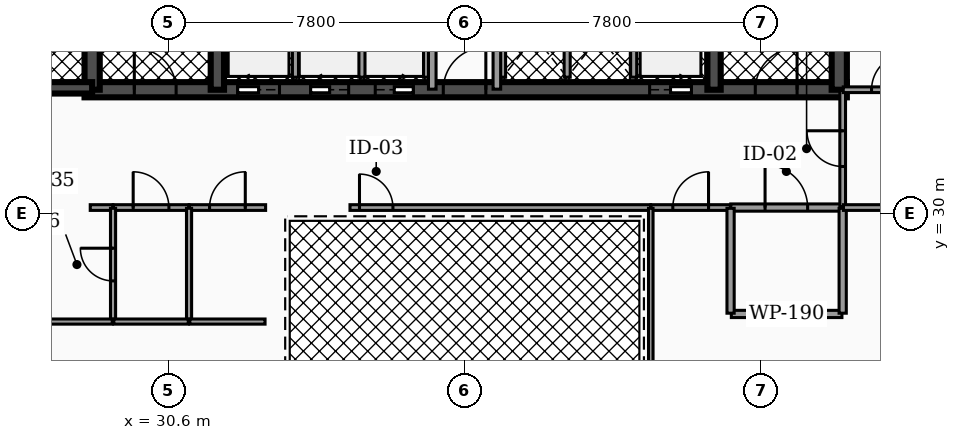
"""IFC4 building model, lengths in metres.
Left out: names, types, materials, properties, quantities, classifications, styles, units other than length and angle.
Written with IfcOpenShell. Run it as: python <this file> out.ifc"""

import sys

from ifc_helpers import new_model, si_unit, direction, frame, frame_2d, origin, place, context, subcontext, project, spatial, rectangle, extrude, element, fill, save


model = new_model("IFC4")
c1 = context("Model", 3, precision=1e-05, world=origin(), true_north=direction((0.0, 1.0)))
c2 = subcontext(c1, "Body", "Model", "MODEL_VIEW")
j1 = project(units=[si_unit("LENGTHUNIT", "METRE"), si_unit("PLANEANGLEUNIT", "RADIAN")], contexts=[c1])
p1 = place(None, origin())
s1 = spatial("IfcSite", under=j1, at=p1, CompositionType="ELEMENT")
p2 = place(p1, origin())
s2 = spatial("IfcBuilding", under=s1, at=p2, CompositionType="ELEMENT")
p3 = place(p2, frame((0.0, 0.0, 187.0)))
s3 = spatial("IfcBuildingStorey", under=s2, at=p3, CompositionType="ELEMENT", Elevation=187.0)
p4 = place(p3, frame((28.4, 33.25, 0.0), z_axis=(0.0, 0.0, 1.0), x_axis=(1.0, 0.0, 0.0)))
e1 = element("IfcWall", 1, at=p4, inside=s3, PredefinedType="SHEAR", context=c2, shape_type="SweptSolid", body=[
    extrude(rectangle(XDim=20.06, YDim=0.4, at=frame_2d((10.03, 0.0))), origin(), (0.0, 0.0, 1.0), 3.5),
])
p5 = place(p4, frame((4.03, 0.0, 0.0)))
e2 = element("IfcOpeningElement", 2, at=p5, cuts=e1, PredefinedType="OPENING", context=c2, shape_type="SweptSolid", body=[
    extrude(rectangle(XDim=1.1, YDim=2.15, at=frame_2d((0.55, 1.075))), frame((0.0, 0.21, 0.0), z_axis=(0.0, -1.0, 0.0), x_axis=(1.0, 0.0, 0.0)), (0.0, 0.0, 1.0), 0.42),
])
p6 = place(p4, frame((14.87, 0.0, 0.0)))
e3 = element("IfcOpeningElement", 3, at=p6, cuts=e1, PredefinedType="OPENING", context=c2, shape_type="SweptSolid", body=[
    extrude(rectangle(XDim=1.1, YDim=2.15, at=frame_2d((0.55, 1.075))), frame((0.0, 0.21, 0.0), z_axis=(0.0, -1.0, 0.0), x_axis=(1.0, 0.0, 0.0)), (0.0, 0.0, 1.0), 0.42),
])
p7 = place(p4, frame((5.95, 0.0, 0.0)))
e4 = element("IfcOpeningElement", 4, at=p7, cuts=e1, PredefinedType="OPENING", context=c2, shape_type="SweptSolid", body=[
    extrude(rectangle(XDim=1.0, YDim=2.1, at=frame_2d((0.5, 1.05))), frame((0.0, 0.21, 0.0), z_axis=(0.0, -1.0, 0.0), x_axis=(1.0, 0.0, 0.0)), (0.0, 0.0, 1.0), 0.42),
])
p8 = place(p4, frame((7.65, 0.0, 0.0)))
e5 = element("IfcOpeningElement", 5, at=p8, cuts=e1, PredefinedType="OPENING", context=c2, shape_type="SweptSolid", body=[
    extrude(rectangle(XDim=1.0, YDim=2.1, at=frame_2d((0.5, 1.05))), frame((0.0, 0.21, 0.0), z_axis=(0.0, -1.0, 0.0), x_axis=(1.0, 0.0, 0.0)), (0.0, 0.0, 1.0), 0.42),
])
p9 = place(p4, frame((1.31, 0.0, 0.0)))
e6 = element("IfcOpeningElement", 6, at=p9, cuts=e1, PredefinedType="OPENING", context=c2, shape_type="SweptSolid", body=[
    extrude(rectangle(XDim=1.1, YDim=2.2, at=frame_2d((0.55, 1.1))), frame((0.0, 0.21, 0.0), z_axis=(0.0, -1.0, 0.0), x_axis=(1.0, 0.0, 0.0)), (0.0, 0.0, 1.0), 0.42),
])
p10 = place(p4, frame((9.44, 0.0, 0.0)))
e7 = element("IfcOpeningElement", 7, at=p10, cuts=e1, PredefinedType="OPENING", context=c2, shape_type="SweptSolid", body=[
    extrude(rectangle(XDim=1.12, YDim=2.05, at=frame_2d((0.56, 1.025))), frame((0.0, 0.21, 0.0), z_axis=(0.0, -1.0, 0.0), x_axis=(1.0, 0.0, 0.0)), (0.0, 0.0, 1.0), 0.42),
])
p11 = place(p4, frame((17.65, 0.0, 0.0)))
e8 = element("IfcOpeningElement", 8, at=p11, cuts=e1, PredefinedType="OPENING", context=c2, shape_type="SweptSolid", body=[
    extrude(rectangle(XDim=1.1, YDim=2.2, at=frame_2d((0.55, 1.1))), frame((0.0, 0.21, 0.0), z_axis=(0.0, -1.0, 0.0), x_axis=(1.0, 0.0, 0.0)), (0.0, 0.0, 1.0), 0.42),
])
p12 = place(p3, frame((28.6, 33.25, 0.0), z_axis=(0.0, 0.0, 1.0), x_axis=(0.0, 1.0, 0.0)))
e9 = element("IfcWall", 9, at=p12, inside=s3, PredefinedType="SHEAR", context=c2, shape_type="SweptSolid", body=[
    extrude(rectangle(XDim=10.2, YDim=0.4, at=frame_2d((5.1, 0.0))), origin(), (0.0, 0.0, 1.0), 3.5),
])
for number, where, z_axis, x_axis in (
    (10, (31.895, 33.25, 0.0), (0.0, 0.0, 1.0), (0.0, 1.0, 0.0)),
    (11, (44.965, 33.25, 0.0), (0.0, 0.0, 1.0), (0.0, 1.0, 0.0)),
):
    element("IfcWall", number, at=place(p3, frame(where, z_axis=z_axis, x_axis=x_axis)), inside=s3, PredefinedType="SHEAR", context=c2, shape_type="SweptSolid", body=[
        extrude(rectangle(XDim=10.2, YDim=0.35, at=frame_2d((5.1, 0.0))), origin(), (0.0, 0.0, 1.0), 3.5),
    ])
p13 = place(p3, frame((48.26, 33.25, 0.0), z_axis=(0.0, 0.0, 1.0), x_axis=(0.0, 1.0, 0.0)))
e12 = element("IfcWall", 12, at=p13, inside=s3, PredefinedType="SHEAR", context=c2, shape_type="SweptSolid", body=[
    extrude(rectangle(XDim=10.2, YDim=0.4, at=frame_2d((5.1, 0.0))), origin(), (0.0, 0.0, 1.0), 3.5),
])
p14 = place(p3, frame((25.08, 33.3, 0.0), z_axis=(0.0, 0.0, 1.0), x_axis=(1.0, 0.0, 0.0)))
e13 = element("IfcWall", 13, at=p14, inside=s3, PredefinedType="SHEAR", context=c2, shape_type="SweptSolid", body=[
    extrude(rectangle(XDim=3.52, YDim=0.3, at=frame_2d((1.76, 0.0))), origin(), (0.0, 0.0, 1.0), 3.5),
])
p15 = place(p14, frame((1.335, 0.0, 0.0)))
e14 = element("IfcOpeningElement", 14, at=p15, cuts=e13, PredefinedType="OPENING", context=c2, shape_type="SweptSolid", body=[
    extrude(rectangle(XDim=0.95, YDim=2.2, at=frame_2d((0.475, 1.1))), frame((0.0, 0.16, 0.0), z_axis=(0.0, -1.0, 0.0), x_axis=(1.0, 0.0, 0.0)), (0.0, 0.0, 1.0), 0.32),
])
for number, where, z_axis, x_axis in (
    (15, (33.95, 33.58, 0.0), (0.0, 0.0, 1.0), (0.0, 1.0, 0.0)),
    (16, (42.85, 33.58, 0.0), (0.0, 0.0, 1.0), (0.0, 1.0, 0.0)),
):
    element("IfcWall", number, at=place(p3, frame(where, z_axis=z_axis, x_axis=x_axis)), inside=s3, PredefinedType="SOLIDWALL", context=c2, shape_type="SweptSolid", body=[
        extrude(rectangle(XDim=2.45, YDim=0.16, at=frame_2d((1.225, 0.0))), origin(), (0.0, 0.0, 1.0), 2.472),
    ])
for number, where, z_axis, x_axis in (
    (17, (35.7, 33.58, 0.0), (0.0, 0.0, 1.0), (0.0, 1.0, 0.0)),
    (18, (37.4, 33.58, 0.0), (0.0, 0.0, 1.0), (0.0, 1.0, 0.0)),
    (19, (39.4, 33.58, 0.0), (0.0, 0.0, 1.0), (0.0, 1.0, 0.0)),
    (20, (41.1, 33.58, 0.0), (0.0, 0.0, 1.0), (0.0, 1.0, 0.0)),
):
    element("IfcWall", number, at=place(p3, frame(where, z_axis=z_axis, x_axis=x_axis)), inside=s3, PredefinedType="SOLIDWALL", context=c2, shape_type="SweptSolid", body=[
        extrude(rectangle(XDim=2.25, YDim=0.16, at=frame_2d((1.125, 0.0))), origin(), (0.0, 0.0, 1.0), 2.472),
    ])
p16 = place(p3, frame((37.55, 33.265, 0.0), z_axis=(0.0, 0.0, 1.0), x_axis=(0.0, 1.0, 0.0)))
e21 = element("IfcWall", 21, at=p16, inside=s3, PredefinedType="PARTITIONING", context=c2, shape_type="SweptSolid", body=[
    extrude(rectangle(XDim=4.595, YDim=0.2, at=frame_2d((2.298, 0.0))), origin(), (0.0, 0.0, 1.0), 2.457),
])
p17 = place(p16, frame((3.058, 0.0, 0.0)))
e22 = element("IfcOpeningElement", 22, at=p17, cuts=e21, PredefinedType="OPENING", context=c2, shape_type="SweptSolid", body=[
    extrude(rectangle(XDim=0.88, YDim=2.05, at=frame_2d((0.44, 1.025))), frame((0.0, 0.11, 0.0), z_axis=(0.0, -1.0, 0.0), x_axis=(1.0, 0.0, 0.0)), (0.0, 0.0, 1.0), 0.22),
])
p18 = place(p3, frame((39.25, 33.265, 0.0), z_axis=(0.0, 0.0, 1.0), x_axis=(0.0, 1.0, 0.0)))
e23 = element("IfcWall", 23, at=p18, inside=s3, PredefinedType="PARTITIONING", context=c2, shape_type="SweptSolid", body=[
    extrude(rectangle(XDim=4.595, YDim=0.2, at=frame_2d((2.298, 0.0))), origin(), (0.0, 0.0, 1.0), 2.457),
])
p19 = place(p18, frame((3.058, 0.0, 0.0)))
e24 = element("IfcOpeningElement", 24, at=p19, cuts=e23, PredefinedType="OPENING", context=c2, shape_type="SweptSolid", body=[
    extrude(rectangle(XDim=0.88, YDim=2.05, at=frame_2d((0.44, 1.025))), frame((0.0, 0.11, 0.0), z_axis=(0.0, -1.0, 0.0), x_axis=(1.0, 0.0, 0.0)), (0.0, 0.0, 1.0), 0.22),
])
p20 = place(p3, frame((45.405, 30.15, 0.0), z_axis=(0.0, 0.0, 1.0), x_axis=(1.0, 0.0, 0.0)))
e25 = element("IfcWall", 25, at=p20, inside=s3, PredefinedType="PARTITIONING", context=c2, shape_type="SweptSolid", body=[
    extrude(rectangle(XDim=2.925, YDim=0.19, at=frame_2d((1.462, 0.0))), origin(), (0.0, 0.0, 1.0), 2.457),
])
p21 = place(p20, frame((0.903, 0.0, 0.0)))
e26 = element("IfcOpeningElement", 26, at=p21, cuts=e25, PredefinedType="OPENING", context=c2, shape_type="SweptSolid", body=[
    extrude(rectangle(XDim=1.12, YDim=2.05, at=frame_2d((0.56, 1.025))), frame((0.0, 0.105, 0.0), z_axis=(0.0, -1.0, 0.0), x_axis=(1.0, 0.0, 0.0)), (0.0, 0.0, 1.0), 0.21),
])
p22 = place(p3, frame((48.35, 30.17, 0.0), z_axis=(0.0, 0.0, 1.0), x_axis=(0.0, 1.0, 0.0)))
e27 = element("IfcWall", 27, at=p22, inside=s3, PredefinedType="PARTITIONING", context=c2, shape_type="SweptSolid", body=[
    extrude(rectangle(XDim=3.06, YDim=0.15, at=frame_2d((1.53, 0.0))), origin(), (0.0, 0.0, 1.0), 2.457),
])
p23 = place(p22, frame((1.06, 0.0, 0.0)))
e28 = element("IfcOpeningElement", 28, at=p23, cuts=e27, PredefinedType="OPENING", context=c2, shape_type="SweptSolid", body=[
    extrude(rectangle(XDim=0.94, YDim=2.05, at=frame_2d((0.47, 1.025))), frame((0.0, 0.085, 0.0), z_axis=(0.0, -1.0, 0.0), x_axis=(1.0, 0.0, 0.0)), (0.0, 0.0, 1.0), 0.17),
])
p24 = place(p3, frame((28.55, 30.15, 0.0), z_axis=(0.0, 0.0, 1.0), x_axis=(1.0, 0.0, 0.0)))
e29 = element("IfcWall", 29, at=p24, inside=s3, PredefinedType="PARTITIONING", context=c2, shape_type="SweptSolid", body=[
    extrude(rectangle(XDim=0.595, YDim=0.15, at=frame_2d((0.297, 0.0))), origin(), (0.0, 0.0, 1.0), 2.457),
])
p25 = place(p3, frame((29.155, 30.15, 0.0), z_axis=(0.0, 0.0, 1.0), x_axis=(1.0, 0.0, 0.0)))
e30 = element("IfcWall", 30, at=p25, inside=s3, PredefinedType="PARTITIONING", context=c2, shape_type="SweptSolid", body=[
    extrude(rectangle(XDim=1.99, YDim=0.15, at=frame_2d((0.995, 0.0))), origin(), (0.0, 0.0, 1.0), 2.457),
])
p26 = place(p25, frame((0.525, 0.0, 0.0)))
e31 = element("IfcOpeningElement", 31, at=p26, cuts=e30, PredefinedType="OPENING", context=c2, shape_type="SweptSolid", body=[
    extrude(rectangle(XDim=0.94, YDim=2.05, at=frame_2d((0.47, 1.025))), frame((0.0, 0.085, 0.0), z_axis=(0.0, -1.0, 0.0), x_axis=(1.0, 0.0, 0.0)), (0.0, 0.0, 1.0), 0.17),
])
p27 = place(p3, frame((31.155, 30.15, 0.0), z_axis=(0.0, 0.0, 1.0), x_axis=(1.0, 0.0, 0.0)))
e32 = element("IfcWall", 32, at=p27, inside=s3, PredefinedType="PARTITIONING", context=c2, shape_type="SweptSolid", body=[
    extrude(rectangle(XDim=2.01, YDim=0.15, at=frame_2d((1.005, 0.0))), origin(), (0.0, 0.0, 1.0), 2.457),
])
p28 = place(p27, frame((0.535, 0.0, 0.0)))
e33 = element("IfcOpeningElement", 33, at=p28, cuts=e32, PredefinedType="OPENING", context=c2, shape_type="SweptSolid", body=[
    extrude(rectangle(XDim=0.94, YDim=2.05, at=frame_2d((0.47, 1.025))), frame((0.0, 0.085, 0.0), z_axis=(0.0, -1.0, 0.0), x_axis=(1.0, 0.0, 0.0)), (0.0, 0.0, 1.0), 0.17),
])
p29 = place(p3, frame((35.385, 30.15, 0.0), z_axis=(0.0, 0.0, 1.0), x_axis=(1.0, 0.0, 0.0)))
e34 = element("IfcWall", 34, at=p29, inside=s3, PredefinedType="PARTITIONING", context=c2, shape_type="SweptSolid", body=[
    extrude(rectangle(XDim=7.91, YDim=0.15, at=frame_2d((3.955, 0.0))), origin(), (0.0, 0.0, 1.0), 2.457),
])
p30 = place(p29, frame((0.25, 0.0, 0.0)))
e35 = element("IfcOpeningElement", 35, at=p30, cuts=e34, PredefinedType="OPENING", context=c2, shape_type="SweptSolid", body=[
    extrude(rectangle(XDim=0.88, YDim=2.05, at=frame_2d((0.44, 1.025))), frame((0.0, 0.085, 0.0), z_axis=(0.0, -1.0, 0.0), x_axis=(1.0, 0.0, 0.0)), (0.0, 0.0, 1.0), 0.17),
])
p31 = place(p3, frame((43.305, 30.15, 0.0), z_axis=(0.0, 0.0, 1.0), x_axis=(1.0, 0.0, 0.0)))
e36 = element("IfcWall", 36, at=p31, inside=s3, PredefinedType="PARTITIONING", context=c2, shape_type="SweptSolid", body=[
    extrude(rectangle(XDim=2.09, YDim=0.15, at=frame_2d((1.045, 0.0))), origin(), (0.0, 0.0, 1.0), 2.457),
])
p32 = place(p31, frame((0.575, 0.0, 0.0)))
e37 = element("IfcOpeningElement", 37, at=p32, cuts=e36, PredefinedType="OPENING", context=c2, shape_type="SweptSolid", body=[
    extrude(rectangle(XDim=0.94, YDim=2.05, at=frame_2d((0.47, 1.025))), frame((0.0, 0.085, 0.0), z_axis=(0.0, -1.0, 0.0), x_axis=(1.0, 0.0, 0.0)), (0.0, 0.0, 1.0), 0.17),
])
p33 = place(p3, frame((45.42, 27.35, 0.0), z_axis=(0.0, 0.0, 1.0), x_axis=(1.0, 0.0, 0.0)))
e38 = element("IfcWall", 38, at=p33, inside=s3, PredefinedType="PARTITIONING", context=c2, shape_type="SweptSolid", body=[
    extrude(rectangle(XDim=2.91, YDim=0.19, at=frame_2d((1.455, 0.0))), origin(), (0.0, 0.0, 1.0), 2.457),
])
for number, where, z_axis, x_axis in (
    (39, (45.4, 27.37, 0.0), (0.0, 0.0, 1.0), (0.0, 1.0, 0.0)),
    (40, (48.35, 27.37, 0.0), (0.0, 0.0, 1.0), (0.0, 1.0, 0.0)),
):
    element("IfcWall", number, at=place(p3, frame(where, z_axis=z_axis, x_axis=x_axis)), inside=s3, PredefinedType="PARTITIONING", context=c2, shape_type="SweptSolid", body=[
        extrude(rectangle(XDim=2.76, YDim=0.19, at=frame_2d((1.38, 0.0))), origin(), (0.0, 0.0, 1.0), 2.457),
    ])
p34 = place(p3, frame((48.37, 30.15, 0.0), z_axis=(0.0, 0.0, 1.0), x_axis=(1.0, 0.0, 0.0)))
e41 = element("IfcWall", 41, at=p34, inside=s3, PredefinedType="PARTITIONING", context=c2, shape_type="SweptSolid", body=[
    extrude(rectangle(XDim=3.26, YDim=0.15, at=frame_2d((1.63, 0.0))), origin(), (0.0, 0.0, 1.0), 2.457),
])
p35 = place(p34, frame((1.16, 0.0, 0.0)))
e42 = element("IfcOpeningElement", 42, at=p35, cuts=e41, PredefinedType="OPENING", context=c2, shape_type="SweptSolid", body=[
    extrude(rectangle(XDim=0.94, YDim=2.05, at=frame_2d((0.47, 1.025))), frame((0.0, 0.085, 0.0), z_axis=(0.0, -1.0, 0.0), x_axis=(1.0, 0.0, 0.0)), (0.0, 0.0, 1.0), 0.17),
])
p36 = place(p3, frame((48.365, 33.25, 0.0), z_axis=(0.0, 0.0, 1.0), x_axis=(1.0, 0.0, 0.0)))
e43 = element("IfcWall", 43, at=p36, inside=s3, PredefinedType="PARTITIONING", context=c2, shape_type="SweptSolid", body=[
    extrude(rectangle(XDim=2.43, YDim=0.15, at=frame_2d((1.215, 0.0))), origin(), (0.0, 0.0, 1.0), 2.457),
])
p37 = place(p36, frame((0.745, 0.0, 0.0)))
e44 = element("IfcOpeningElement", 44, at=p37, cuts=e43, PredefinedType="OPENING", context=c2, shape_type="SweptSolid", body=[
    extrude(rectangle(XDim=0.94, YDim=2.05, at=frame_2d((0.47, 1.025))), frame((0.0, 0.085, 0.0), z_axis=(0.0, -1.0, 0.0), x_axis=(1.0, 0.0, 0.0)), (0.0, 0.0, 1.0), 0.17),
])
p38 = place(p3, frame((29.15, 27.17, 0.0), z_axis=(0.0, 0.0, 1.0), x_axis=(0.0, 1.0, 0.0)))
e45 = element("IfcWall", 45, at=p38, inside=s3, PredefinedType="PARTITIONING", context=c2, shape_type="SweptSolid", body=[
    extrude(rectangle(XDim=2.96, YDim=0.135, at=frame_2d((1.48, 0.0))), origin(), (0.0, 0.0, 1.0), 2.457),
])
p39 = place(p38, frame((1.05, 0.0, 0.0)))
e46 = element("IfcOpeningElement", 46, at=p39, cuts=e45, PredefinedType="OPENING", context=c2, shape_type="SweptSolid", body=[
    extrude(rectangle(XDim=0.86, YDim=2.05, at=frame_2d((0.43, 1.025))), frame((0.0, 0.077, 0.0), z_axis=(0.0, -1.0, 0.0), x_axis=(1.0, 0.0, 0.0)), (0.0, 0.0, 1.0), 0.155),
])
p40 = place(p3, frame((27.17, 27.15, 0.0), z_axis=(0.0, 0.0, 1.0), x_axis=(1.0, 0.0, 0.0)))
e47 = element("IfcWall", 47, at=p40, inside=s3, PredefinedType="PARTITIONING", context=c2, shape_type="SweptSolid", body=[
    extrude(rectangle(XDim=1.96, YDim=0.135, at=frame_2d((0.98, 0.0))), origin(), (0.0, 0.0, 1.0), 2.457),
])
p41 = place(p3, frame((31.15, 27.17, 0.0), z_axis=(0.0, 0.0, 1.0), x_axis=(0.0, 1.0, 0.0)))
e48 = element("IfcWall", 48, at=p41, inside=s3, PredefinedType="PARTITIONING", context=c2, shape_type="SweptSolid", body=[
    extrude(rectangle(XDim=2.96, YDim=0.135, at=frame_2d((1.48, 0.0))), origin(), (0.0, 0.0, 1.0), 2.457),
])
p42 = place(p3, frame((29.17, 27.15, 0.0), z_axis=(0.0, 0.0, 1.0), x_axis=(1.0, 0.0, 0.0)))
e49 = element("IfcWall", 49, at=p42, inside=s3, PredefinedType="PARTITIONING", context=c2, shape_type="SweptSolid", body=[
    extrude(rectangle(XDim=1.96, YDim=0.135, at=frame_2d((0.98, 0.0))), origin(), (0.0, 0.0, 1.0), 2.457),
])
p43 = place(p3, frame((31.17, 27.15, 0.0), z_axis=(0.0, 0.0, 1.0), x_axis=(1.0, 0.0, 0.0)))
e50 = element("IfcWall", 50, at=p43, inside=s3, PredefinedType="PARTITIONING", context=c2, shape_type="SweptSolid", body=[
    extrude(rectangle(XDim=1.98, YDim=0.135, at=frame_2d((0.99, 0.0))), origin(), (0.0, 0.0, 1.0), 2.457),
])
p44 = place(p3, frame((43.3, 23.9, 0.0), z_axis=(0.0, 0.0, 1.0), x_axis=(0.0, 1.0, 0.0)))
e51 = element("IfcWall", 51, at=p44, inside=s3, PredefinedType="PARTITIONING", context=c2, shape_type="SweptSolid", body=[
    extrude(rectangle(XDim=6.23, YDim=0.12, at=frame_2d((3.115, 0.0))), origin(), (0.0, 0.0, 1.0), 2.457),
])
p45 = place(p5, origin())
e52 = element("IfcDoor", 52, at=p45, inside=s3, OperationType="SLIDING_TO_LEFT", PredefinedType="DOOR", context=c2, shape_type="SweptSolid", body=[
    extrude(rectangle(XDim=1.1, YDim=2.15, at=frame_2d((0.55, 1.075))), frame((0.0, 0.025, 0.0), z_axis=(0.0, -1.0, 0.0), x_axis=(1.0, 0.0, 0.0)), (0.0, 0.0, 1.0), 0.05),
])
fill(e2, e52)
p46 = place(p6, origin())
e53 = element("IfcDoor", 53, at=p46, inside=s3, OperationType="SLIDING_TO_RIGHT", PredefinedType="DOOR", context=c2, shape_type="SweptSolid", body=[
    extrude(rectangle(XDim=1.1, YDim=2.15, at=frame_2d((0.55, 1.075))), frame((0.0, 0.025, 0.0), z_axis=(0.0, -1.0, 0.0), x_axis=(1.0, 0.0, 0.0)), (0.0, 0.0, 1.0), 0.05),
])
fill(e3, e53)
p47 = place(p7, origin())
e54 = element("IfcDoor", 54, at=p47, inside=s3, OperationType="SLIDING_TO_LEFT", PredefinedType="DOOR", context=c2, shape_type="SweptSolid", body=[
    extrude(rectangle(XDim=1.0, YDim=2.1, at=frame_2d((0.5, 1.05))), frame((0.0, 0.025, 0.0), z_axis=(0.0, -1.0, 0.0), x_axis=(1.0, 0.0, 0.0)), (0.0, 0.0, 1.0), 0.05),
])
fill(e4, e54)
p48 = place(p8, origin())
e55 = element("IfcDoor", 55, at=p48, inside=s3, OperationType="SLIDING_TO_RIGHT", PredefinedType="DOOR", context=c2, shape_type="SweptSolid", body=[
    extrude(rectangle(XDim=1.0, YDim=2.1, at=frame_2d((0.5, 1.05))), frame((0.0, 0.025, 0.0), z_axis=(0.0, -1.0, 0.0), x_axis=(1.0, 0.0, 0.0)), (0.0, 0.0, 1.0), 0.05),
])
fill(e5, e55)
p49 = place(p9, origin())
e56 = element("IfcDoor", 56, at=p49, inside=s3, OperationType="SINGLE_SWING_LEFT", PredefinedType="DOOR", context=c2, shape_type="SweptSolid", body=[
    extrude(rectangle(XDim=1.1, YDim=2.2, at=frame_2d((0.55, 1.1))), frame((0.0, 0.025, 0.0), z_axis=(0.0, -1.0, 0.0), x_axis=(1.0, 0.0, 0.0)), (0.0, 0.0, 1.0), 0.05),
])
fill(e6, e56)
p50 = place(p10, origin())
e57 = element("IfcDoor", 57, at=p50, inside=s3, OperationType="SINGLE_SWING_RIGHT", PredefinedType="DOOR", context=c2, shape_type="SweptSolid", body=[
    extrude(rectangle(XDim=1.12, YDim=2.05, at=frame_2d((0.56, 1.025))), frame((0.0, 0.025, 0.0), z_axis=(0.0, -1.0, 0.0), x_axis=(1.0, 0.0, 0.0)), (0.0, 0.0, 1.0), 0.05),
])
fill(e7, e57)
p51 = place(p11, origin())
e58 = element("IfcDoor", 58, at=p51, inside=s3, OperationType="SINGLE_SWING_RIGHT", PredefinedType="DOOR", context=c2, shape_type="SweptSolid", body=[
    extrude(rectangle(XDim=1.1, YDim=2.2, at=frame_2d((0.55, 1.1))), frame((0.0, 0.025, 0.0), z_axis=(0.0, -1.0, 0.0), x_axis=(1.0, 0.0, 0.0)), (0.0, 0.0, 1.0), 0.05),
])
fill(e8, e58)
p52 = place(p21, origin())
e59 = element("IfcDoor", 59, at=p52, inside=s3, OperationType="SINGLE_SWING_LEFT", PredefinedType="DOOR", context=c2, shape_type="SweptSolid", body=[
    extrude(rectangle(XDim=1.12, YDim=2.05, at=frame_2d((0.56, 1.025))), frame((0.0, 0.025, 0.0), z_axis=(0.0, -1.0, 0.0), x_axis=(1.0, 0.0, 0.0)), (0.0, 0.0, 1.0), 0.05),
])
fill(e26, e59)
p53 = place(p23, origin())
e60 = element("IfcDoor", 60, at=p53, inside=s3, OperationType="SINGLE_SWING_RIGHT", PredefinedType="DOOR", context=c2, shape_type="SweptSolid", body=[
    extrude(rectangle(XDim=0.94, YDim=2.05, at=frame_2d((0.47, 1.025))), frame((0.0, 0.025, 0.0), z_axis=(0.0, -1.0, 0.0), x_axis=(1.0, 0.0, 0.0)), (0.0, 0.0, 1.0), 0.05),
])
fill(e28, e60)
p54 = place(p26, origin())
e61 = element("IfcDoor", 61, at=p54, inside=s3, OperationType="SINGLE_SWING_LEFT", PredefinedType="DOOR", context=c2, shape_type="SweptSolid", body=[
    extrude(rectangle(XDim=0.94, YDim=2.05, at=frame_2d((0.47, 1.025))), frame((0.0, 0.025, 0.0), z_axis=(0.0, -1.0, 0.0), x_axis=(1.0, 0.0, 0.0)), (0.0, 0.0, 1.0), 0.05),
])
fill(e31, e61)
p55 = place(p28, origin())
e62 = element("IfcDoor", 62, at=p55, inside=s3, OperationType="SINGLE_SWING_RIGHT", PredefinedType="DOOR", context=c2, shape_type="SweptSolid", body=[
    extrude(rectangle(XDim=0.94, YDim=2.05, at=frame_2d((0.47, 1.025))), frame((0.0, 0.025, 0.0), z_axis=(0.0, -1.0, 0.0), x_axis=(1.0, 0.0, 0.0)), (0.0, 0.0, 1.0), 0.05),
])
fill(e33, e62)
p56 = place(p30, origin())
e63 = element("IfcDoor", 63, at=p56, inside=s3, OperationType="SINGLE_SWING_LEFT", PredefinedType="DOOR", context=c2, shape_type="SweptSolid", body=[
    extrude(rectangle(XDim=0.88, YDim=2.05, at=frame_2d((0.44, 1.025))), frame((0.0, 0.025, 0.0), z_axis=(0.0, -1.0, 0.0), x_axis=(1.0, 0.0, 0.0)), (0.0, 0.0, 1.0), 0.05),
])
fill(e35, e63)
p57 = place(p32, origin())
e64 = element("IfcDoor", 64, at=p57, inside=s3, OperationType="SINGLE_SWING_RIGHT", PredefinedType="DOOR", context=c2, shape_type="SweptSolid", body=[
    extrude(rectangle(XDim=0.94, YDim=2.05, at=frame_2d((0.47, 1.025))), frame((0.0, 0.025, 0.0), z_axis=(0.0, -1.0, 0.0), x_axis=(1.0, 0.0, 0.0)), (0.0, 0.0, 1.0), 0.05),
])
fill(e37, e64)
p58 = place(p37, origin())
e65 = element("IfcDoor", 65, at=p58, inside=s3, OperationType="SINGLE_SWING_RIGHT", PredefinedType="DOOR", context=c2, shape_type="SweptSolid", body=[
    extrude(rectangle(XDim=0.94, YDim=2.05, at=frame_2d((0.47, 1.025))), frame((0.0, 0.025, 0.0), z_axis=(0.0, -1.0, 0.0), x_axis=(1.0, 0.0, 0.0)), (0.0, 0.0, 1.0), 0.05),
])
fill(e44, e65)
p59 = place(p39, origin())
e66 = element("IfcDoor", 66, at=p59, inside=s3, OperationType="SINGLE_SWING_RIGHT", PredefinedType="DOOR", context=c2, shape_type="SweptSolid", body=[
    extrude(rectangle(XDim=0.86, YDim=2.05, at=frame_2d((0.43, 1.025))), frame((0.0, 0.025, 0.0), z_axis=(0.0, -1.0, 0.0), x_axis=(1.0, 0.0, 0.0)), (0.0, 0.0, 1.0), 0.05),
])
fill(e46, e66)
save(model, sys.argv[1])
